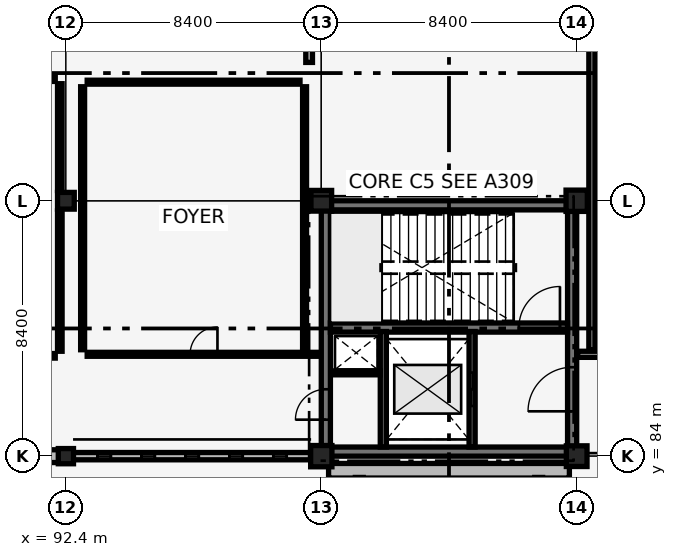
"""IFC4 building model, lengths in metres.
Left out: names, types, materials, properties, quantities, classifications, styles, units other than length and angle.
Written with IfcOpenShell. Run it as: python <this file> out.ifc"""

import sys

from ifc_helpers import new_model, si_unit, direction, frame, frame_2d, origin, origin_2d, place, context, subcontext, project, spatial, rectangle, extrude, element, fill, save


model = new_model("IFC4")
c1 = context("Model", 3, precision=1e-05, world=origin(), true_north=direction((0.0, 1.0)))
c2 = subcontext(c1, "Body", "Model", "MODEL_VIEW")
j1 = project(units=[si_unit("LENGTHUNIT", "METRE"), si_unit("PLANEANGLEUNIT", "RADIAN")], contexts=[c1])
p1 = place(None, origin())
s1 = spatial("IfcSite", under=j1, at=p1, CompositionType="ELEMENT")
p2 = place(p1, origin())
s2 = spatial("IfcBuilding", under=s1, at=p2, CompositionType="ELEMENT")
p3 = place(p2, origin())
s3 = spatial("IfcBuildingStorey", under=s2, at=p3, CompositionType="ELEMENT", Elevation=0.0)
for number, where, z_axis, x_axis in (
    (1, (100.95, 84.15, 0.0), (0.0, 0.0, 1.0), (1.0, 0.0, 0.0)),
    (2, (100.95, 92.25, 0.0), (0.0, 0.0, 1.0), (1.0, 0.0, 0.0)),
):
    element("IfcWall", number, at=place(p3, frame(where, z_axis=z_axis, x_axis=x_axis)), inside=s3, PredefinedType="SHEAR", context=c2, shape_type="SweptSolid", body=[
        extrude(rectangle(XDim=8.1, YDim=0.3, at=frame_2d((4.05, 0.0))), origin(), (0.0, 0.0, 1.0), 5.14),
    ])
p4 = place(p3, frame((100.95, 84.15, 0.0), z_axis=(0.0, 0.0, 1.0), x_axis=(0.0, 1.0, 0.0)))
e3 = element("IfcWall", 3, at=p4, inside=s3, PredefinedType="SHEAR", context=c2, shape_type="SweptSolid", body=[
    extrude(rectangle(XDim=8.1, YDim=0.3, at=frame_2d((4.05, 0.0))), origin(), (0.0, 0.0, 1.0), 5.14),
])
p5 = place(p4, frame((1.05, 0.0, 0.0)))
e4 = element("IfcOpeningElement", 4, at=p5, cuts=e3, PredefinedType="OPENING", context=c2, shape_type="SweptSolid", body=[
    extrude(rectangle(XDim=1.0, YDim=2.15, at=frame_2d((0.5, 1.075))), frame((0.0, 0.16, 0.0), z_axis=(0.0, -1.0, 0.0), x_axis=(1.0, 0.0, 0.0)), (0.0, 0.0, 1.0), 0.32),
])
p6 = place(p3, frame((109.05, 84.15, 0.0), z_axis=(0.0, 0.0, 1.0), x_axis=(0.0, 1.0, 0.0)))
e5 = element("IfcWall", 5, at=p6, inside=s3, PredefinedType="SHEAR", context=c2, shape_type="SweptSolid", body=[
    extrude(rectangle(XDim=8.1, YDim=0.3, at=frame_2d((4.05, 0.0))), origin(), (0.0, 0.0, 1.0), 5.14),
])
p7 = place(p6, frame((1.325, 0.0, 0.0)))
e6 = element("IfcOpeningElement", 6, at=p7, cuts=e5, PredefinedType="OPENING", context=c2, shape_type="SweptSolid", body=[
    extrude(rectangle(XDim=1.45, YDim=2.15, at=frame_2d((0.725, 1.075))), frame((0.0, 0.16, 0.0), z_axis=(0.0, -1.0, 0.0), x_axis=(1.0, 0.0, 0.0)), (0.0, 0.0, 1.0), 0.32),
])
p8 = place(p3, frame((101.1, 88.23, 0.0), z_axis=(0.0, 0.0, 1.0), x_axis=(1.0, 0.0, 0.0)))
e7 = element("IfcWall", 7, at=p8, inside=s3, PredefinedType="SHEAR", context=c2, shape_type="SweptSolid", body=[
    extrude(rectangle(XDim=7.8, YDim=0.3, at=frame_2d((3.9, 0.0))), origin(), (0.0, 0.0, 1.0), 5.14),
])
p9 = place(p8, frame((6.2, 0.0, 0.0)))
e8 = element("IfcOpeningElement", 8, at=p9, cuts=e7, PredefinedType="OPENING", context=c2, shape_type="SweptSolid", body=[
    extrude(rectangle(XDim=1.35, YDim=2.15, at=frame_2d((0.675, 1.075))), frame((0.0, 0.16, 0.0), z_axis=(0.0, -1.0, 0.0), x_axis=(1.0, 0.0, 0.0)), (0.0, 0.0, 1.0), 0.32),
])
p10 = place(p3, frame((92.4, 84.0, -0.32), z_axis=(0.0, 0.0, 1.0), x_axis=(1.0, 0.0, 0.0)))
e9 = element("IfcColumn", 9, at=p10, inside=s3, PredefinedType="COLUMN", context=c2, shape_type="SweptSolid", body=[
    extrude(rectangle(XDim=0.5, YDim=0.5, at=origin_2d()), origin(), (0.0, 0.0, 1.0), 5.46),
])
p11 = place(p3, frame((92.4, 92.4, -0.32), z_axis=(0.0, 0.0, 1.0), x_axis=(1.0, 0.0, 0.0)))
e10 = element("IfcColumn", 10, at=p11, inside=s3, PredefinedType="COLUMN", context=c2, shape_type="SweptSolid", body=[
    extrude(rectangle(XDim=0.55, YDim=0.55, at=origin_2d()), origin(), (0.0, 0.0, 1.0), 5.46),
])
p12 = place(p3, frame((100.8, 84.0, 0.0), z_axis=(0.0, 0.0, 1.0), x_axis=(1.0, 0.0, 0.0)))
e11 = element("IfcColumn", 11, at=p12, inside=s3, PredefinedType="COLUMN", context=c2, shape_type="SweptSolid", body=[
    extrude(rectangle(XDim=0.7, YDim=0.7, at=origin_2d()), origin(), (0.0, 0.0, 1.0), 5.14),
])
for number, where, z_axis, x_axis in (
    (12, (100.8, 92.4, 0.0), (0.0, 0.0, 1.0), (1.0, 0.0, 0.0)),
    (13, (109.2, 84.0, 0.0), (0.0, 0.0, 1.0), (1.0, 0.0, 0.0)),
):
    element("IfcColumn", number, at=place(p3, frame(where, z_axis=z_axis, x_axis=x_axis)), inside=s3, PredefinedType="COLUMN", context=c2, shape_type="SweptSolid", body=[
        extrude(rectangle(XDim=0.68, YDim=0.68, at=origin_2d()), origin(), (0.0, 0.0, 1.0), 5.14),
    ])
p13 = place(p3, frame((109.2, 92.4, 0.0), z_axis=(0.0, 0.0, 1.0), x_axis=(1.0, 0.0, 0.0)))
e14 = element("IfcColumn", 14, at=p13, inside=s3, PredefinedType="COLUMN", context=c2, shape_type="SweptSolid", body=[
    extrude(rectangle(XDim=0.7, YDim=0.7, at=origin_2d()), origin(), (0.0, 0.0, 1.0), 5.14),
])
p14 = place(p3, frame((84.26, 84.0, 0.0), z_axis=(0.0, 0.0, 1.0), x_axis=(1.0, 0.0, 0.0)))
e15 = element("IfcWall", 15, at=p14, inside=s3, PredefinedType="SOLIDWALL", context=c2, shape_type="SweptSolid", body=[
    extrude(rectangle(XDim=7.905, YDim=0.42, at=frame_2d((3.953, 0.0))), origin(), (0.0, 0.0, 1.0), 4.4),
])
p15 = place(p14, frame((2.853, 0.0, 0.0)))
e16 = element("IfcOpeningElement", 16, at=p15, cuts=e15, PredefinedType="OPENING", context=c2, shape_type="SweptSolid", body=[
    extrude(rectangle(XDim=2.2, YDim=2.4, at=frame_2d((1.1, 1.2))), frame((0.0, 0.22, 0.0), z_axis=(0.0, -1.0, 0.0), x_axis=(1.0, 0.0, 0.0)), (0.0, 0.0, 1.0), 0.44),
])
p16 = place(p3, frame((92.635, 84.0, 0.0), z_axis=(0.0, 0.0, 1.0), x_axis=(1.0, 0.0, 0.0)))
e17 = element("IfcWall", 17, at=p16, inside=s3, PredefinedType="SOLIDWALL", context=c2, shape_type="SweptSolid", body=[
    extrude(rectangle(XDim=7.83, YDim=0.24, at=frame_2d((3.915, 0.0))), origin(), (0.0, 0.0, 1.0), 4.4),
])
p17 = place(p16, frame((0.803, 0.0, 0.35)))
e18 = element("IfcOpeningElement", 18, at=p17, cuts=e17, PredefinedType="OPENING", context=c2, shape_type="SweptSolid", body=[
    extrude(rectangle(XDim=0.44, YDim=1.25, at=frame_2d((0.22, 0.625))), frame((0.0, 0.13, 0.0), z_axis=(0.0, -1.0, 0.0), x_axis=(1.0, 0.0, 0.0)), (0.0, 0.0, 1.0), 0.26),
])
p18 = place(p16, frame((2.249, 0.0, 0.35)))
e19 = element("IfcOpeningElement", 19, at=p18, cuts=e17, PredefinedType="OPENING", context=c2, shape_type="SweptSolid", body=[
    extrude(rectangle(XDim=0.44, YDim=1.25, at=frame_2d((0.22, 0.625))), frame((0.0, 0.13, 0.0), z_axis=(0.0, -1.0, 0.0), x_axis=(1.0, 0.0, 0.0)), (0.0, 0.0, 1.0), 0.26),
])
p19 = place(p16, frame((3.695, 0.0, 0.35)))
e20 = element("IfcOpeningElement", 20, at=p19, cuts=e17, PredefinedType="OPENING", context=c2, shape_type="SweptSolid", body=[
    extrude(rectangle(XDim=0.44, YDim=1.25, at=frame_2d((0.22, 0.625))), frame((0.0, 0.13, 0.0), z_axis=(0.0, -1.0, 0.0), x_axis=(1.0, 0.0, 0.0)), (0.0, 0.0, 1.0), 0.26),
])
p20 = place(p16, frame((5.141, 0.0, 0.35)))
e21 = element("IfcOpeningElement", 21, at=p20, cuts=e17, PredefinedType="OPENING", context=c2, shape_type="SweptSolid", body=[
    extrude(rectangle(XDim=0.44, YDim=1.25, at=frame_2d((0.22, 0.625))), frame((0.0, 0.13, 0.0), z_axis=(0.0, -1.0, 0.0), x_axis=(1.0, 0.0, 0.0)), (0.0, 0.0, 1.0), 0.26),
])
p21 = place(p16, frame((6.587, 0.0, 0.35)))
e22 = element("IfcOpeningElement", 22, at=p21, cuts=e17, PredefinedType="OPENING", context=c2, shape_type="SweptSolid", body=[
    extrude(rectangle(XDim=0.44, YDim=1.25, at=frame_2d((0.22, 0.625))), frame((0.0, 0.13, 0.0), z_axis=(0.0, -1.0, 0.0), x_axis=(1.0, 0.0, 0.0)), (0.0, 0.0, 1.0), 0.26),
])
p22 = place(p16, frame((0.803, 0.0, 1.8)))
e23 = element("IfcOpeningElement", 23, at=p22, cuts=e17, PredefinedType="OPENING", context=c2, shape_type="SweptSolid", body=[
    extrude(rectangle(XDim=0.44, YDim=1.25, at=frame_2d((0.22, 0.625))), frame((0.0, 0.13, 0.0), z_axis=(0.0, -1.0, 0.0), x_axis=(1.0, 0.0, 0.0)), (0.0, 0.0, 1.0), 0.26),
])
p23 = place(p16, frame((2.249, 0.0, 1.8)))
e24 = element("IfcOpeningElement", 24, at=p23, cuts=e17, PredefinedType="OPENING", context=c2, shape_type="SweptSolid", body=[
    extrude(rectangle(XDim=0.44, YDim=1.25, at=frame_2d((0.22, 0.625))), frame((0.0, 0.13, 0.0), z_axis=(0.0, -1.0, 0.0), x_axis=(1.0, 0.0, 0.0)), (0.0, 0.0, 1.0), 0.26),
])
p24 = place(p16, frame((3.695, 0.0, 1.8)))
e25 = element("IfcOpeningElement", 25, at=p24, cuts=e17, PredefinedType="OPENING", context=c2, shape_type="SweptSolid", body=[
    extrude(rectangle(XDim=0.44, YDim=1.25, at=frame_2d((0.22, 0.625))), frame((0.0, 0.13, 0.0), z_axis=(0.0, -1.0, 0.0), x_axis=(1.0, 0.0, 0.0)), (0.0, 0.0, 1.0), 0.26),
])
p25 = place(p16, frame((5.141, 0.0, 1.8)))
e26 = element("IfcOpeningElement", 26, at=p25, cuts=e17, PredefinedType="OPENING", context=c2, shape_type="SweptSolid", body=[
    extrude(rectangle(XDim=0.44, YDim=1.25, at=frame_2d((0.22, 0.625))), frame((0.0, 0.13, 0.0), z_axis=(0.0, -1.0, 0.0), x_axis=(1.0, 0.0, 0.0)), (0.0, 0.0, 1.0), 0.26),
])
p26 = place(p16, frame((6.587, 0.0, 1.8)))
e27 = element("IfcOpeningElement", 27, at=p26, cuts=e17, PredefinedType="OPENING", context=c2, shape_type="SweptSolid", body=[
    extrude(rectangle(XDim=0.44, YDim=1.25, at=frame_2d((0.22, 0.625))), frame((0.0, 0.13, 0.0), z_axis=(0.0, -1.0, 0.0), x_axis=(1.0, 0.0, 0.0)), (0.0, 0.0, 1.0), 0.26),
])
p27 = place(p3, frame((101.04, 83.52, -0.25), z_axis=(0.0, 0.0, 1.0), x_axis=(1.0, 0.0, 0.0)))
e28 = element("IfcWall", 28, at=p27, inside=s3, PredefinedType="SOLIDWALL", context=c2, shape_type="SweptSolid", body=[
    extrude(rectangle(XDim=7.92, YDim=0.48, at=frame_2d((3.96, 0.0))), origin(), (0.0, 0.0, 1.0), 5.69),
])
p28 = place(p3, frame((105.76, 84.3, 0.0), z_axis=(0.0, 0.0, 1.0), x_axis=(0.0, 1.0, 0.0)))
e29 = element("IfcWall", 29, at=p28, inside=s3, PredefinedType="SHEAR", context=c2, shape_type="SweptSolid", body=[
    extrude(rectangle(XDim=3.8, YDim=0.2, at=frame_2d((1.9, 0.0))), origin(), (0.0, 0.0, 1.0), 4.4),
])
p29 = place(p28, frame((1.35, 0.0, 0.0)))
e30 = element("IfcOpeningElement", 30, at=p29, cuts=e29, PredefinedType="OPENING", context=c2, shape_type="SweptSolid", body=[
    extrude(rectangle(XDim=1.1, YDim=2.15, at=frame_2d((0.55, 1.075))), frame((0.0, 0.11, 0.0), z_axis=(0.0, -1.0, 0.0), x_axis=(1.0, 0.0, 0.0)), (0.0, 0.0, 1.0), 0.22),
])
p30 = place(p3, frame((102.84, 84.3, 0.0), z_axis=(0.0, 0.0, 1.0), x_axis=(0.0, 1.0, 0.0)))
e31 = element("IfcWall", 31, at=p30, inside=s3, PredefinedType="SHEAR", context=c2, shape_type="SweptSolid", body=[
    extrude(rectangle(XDim=3.8, YDim=0.2, at=frame_2d((1.9, 0.0))), origin(), (0.0, 0.0, 1.0), 4.4),
])
p31 = place(p3, frame((101.12, 86.74, 0.0), z_axis=(0.0, 0.0, 1.0), x_axis=(1.0, 0.0, 0.0)))
e32 = element("IfcWall", 32, at=p31, inside=s3, PredefinedType="PARTITIONING", context=c2, shape_type="SweptSolid", body=[
    extrude(rectangle(XDim=1.62, YDim=0.13, at=frame_2d((0.81, 0.0))), origin(), (0.0, 0.0, 1.0), 5.14),
])
p32 = place(p3, frame((71.38, 87.3, 0.0), z_axis=(0.0, 0.0, 1.0), x_axis=(1.0, 0.0, 0.0)))
e33 = element("IfcWall", 33, at=p32, inside=s3, PredefinedType="PARTITIONING", context=c2, shape_type="SweptSolid", body=[
    extrude(rectangle(XDim=20.67, YDim=0.15, at=frame_2d((10.335, 0.0))), origin(), (0.0, 0.0, 1.0), 4.49),
])
p33 = place(p32, frame((9.81, 0.0, 0.0)))
e34 = element("IfcOpeningElement", 34, at=p33, cuts=e33, PredefinedType="OPENING", context=c2, shape_type="SweptSolid", body=[
    extrude(rectangle(XDim=1.05, YDim=2.15, at=frame_2d((0.525, 1.075))), frame((0.0, 0.085, 0.0), z_axis=(0.0, -1.0, 0.0), x_axis=(1.0, 0.0, 0.0)), (0.0, 0.0, 1.0), 0.17),
])
p34 = place(p3, frame((71.38, 96.4, 0.0), z_axis=(0.0, 0.0, 1.0), x_axis=(1.0, 0.0, 0.0)))
e35 = element("IfcWall", 35, at=p34, inside=s3, PredefinedType="PARTITIONING", context=c2, shape_type="SweptSolid", body=[
    extrude(rectangle(XDim=20.67, YDim=0.15, at=frame_2d((10.335, 0.0))), origin(), (0.0, 0.0, 1.0), 4.74),
])
p35 = place(p3, frame((92.2, 87.45, 0.0), z_axis=(0.0, 0.0, 1.0), x_axis=(0.0, 1.0, 0.0)))
e36 = element("IfcWall", 36, at=p35, inside=s3, PredefinedType="PARTITIONING", context=c2, shape_type="SweptSolid", body=[
    extrude(rectangle(XDim=4.615, YDim=0.15, at=frame_2d((2.308, 0.0))), origin(), (0.0, 0.0, 1.0), 4.59),
])
p36 = place(p3, frame((92.2, 92.735, 0.0), z_axis=(0.0, 0.0, 1.0), x_axis=(0.0, 1.0, 0.0)))
e37 = element("IfcWall", 37, at=p36, inside=s3, PredefinedType="PARTITIONING", context=c2, shape_type="SweptSolid", body=[
    extrude(rectangle(XDim=3.515, YDim=0.15, at=frame_2d((1.757, 0.0))), origin(), (0.0, 0.0, 1.0), 5.14),
])
p37 = place(p3, frame((93.1, 87.35, 0.0), z_axis=(0.0, 0.0, 1.0), x_axis=(1.0, 0.0, 0.0)))
e38 = element("IfcWall", 38, at=p37, inside=s3, PredefinedType="PARTITIONING", context=c2, shape_type="SweptSolid", body=[
    extrude(rectangle(XDim=7.67, YDim=0.13, at=frame_2d((3.835, 0.0))), origin(), (0.0, 0.0, 1.0), 4.49),
])
p38 = place(p37, frame((3.385, 0.0, 0.0)))
e39 = element("IfcOpeningElement", 39, at=p38, cuts=e38, PredefinedType="OPENING", context=c2, shape_type="SweptSolid", body=[
    extrude(rectangle(XDim=0.9, YDim=2.1, at=frame_2d((0.45, 1.05))), frame((0.0, 0.075, 0.0), z_axis=(0.0, -1.0, 0.0), x_axis=(1.0, 0.0, 0.0)), (0.0, 0.0, 1.0), 0.15),
])
p39 = place(p3, frame((93.1, 96.3, 0.0), z_axis=(0.0, 0.0, 1.0), x_axis=(1.0, 0.0, 0.0)))
e40 = element("IfcWall", 40, at=p39, inside=s3, PredefinedType="PARTITIONING", context=c2, shape_type="SweptSolid", body=[
    extrude(rectangle(XDim=7.0, YDim=0.13, at=frame_2d((3.5, 0.0))), origin(), (0.0, 0.0, 1.0), 5.14),
])
for number, where, z_axis, x_axis in (
    (41, (92.95, 87.5, 0.0), (0.0, 0.0, 1.0), (0.0, 1.0, 0.0)),
    (42, (100.25, 87.5, 0.0), (0.0, 0.0, 1.0), (0.0, 1.0, 0.0)),
):
    element("IfcWall", number, at=place(p3, frame(where, z_axis=z_axis, x_axis=x_axis)), inside=s3, PredefinedType="PARTITIONING", context=c2, shape_type="SweptSolid", body=[
        extrude(rectangle(XDim=8.65, YDim=0.13, at=frame_2d((4.325, 0.0))), origin(), (0.0, 0.0, 1.0), 4.46),
    ])
p40 = place(p3, frame((100.4, 96.95, 0.0), z_axis=(0.0, 0.0, 1.0), x_axis=(0.0, 1.0, 0.0)))
e43 = element("IfcWall", 43, at=p40, inside=s3, PredefinedType="PARTITIONING", context=c2, shape_type="SweptSolid", body=[
    extrude(rectangle(XDim=3.44, YDim=0.22, at=frame_2d((1.72, 0.0))), origin(), (0.0, 0.0, 1.0), 5.14),
])
p41 = place(p40, frame((0.87, 0.0, 0.0)))
e44 = element("IfcOpeningElement", 44, at=p41, cuts=e43, PredefinedType="OPENING", context=c2, shape_type="SweptSolid", body=[
    extrude(rectangle(XDim=1.7, YDim=2.25, at=frame_2d((0.85, 1.125))), frame((0.0, 0.12, 0.0), z_axis=(0.0, -1.0, 0.0), x_axis=(1.0, 0.0, 0.0)), (0.0, 0.0, 1.0), 0.24),
])
p42 = place(p3, frame((109.23, 87.35, 0.0), z_axis=(0.0, 0.0, 1.0), x_axis=(1.0, 0.0, 0.0)))
e45 = element("IfcWall", 45, at=p42, inside=s3, PredefinedType="PARTITIONING", context=c2, shape_type="SweptSolid", body=[
    extrude(rectangle(XDim=16.74, YDim=0.2, at=frame_2d((8.37, 0.0))), origin(), (0.0, 0.0, 1.0), 4.49),
])
p43 = place(p42, frame((7.62, 0.0, 0.0)))
e46 = element("IfcOpeningElement", 46, at=p43, cuts=e45, PredefinedType="OPENING", context=c2, shape_type="SweptSolid", body=[
    extrude(rectangle(XDim=1.5, YDim=2.2, at=frame_2d((0.75, 1.1))), frame((0.0, 0.11, 0.0), z_axis=(0.0, -1.0, 0.0), x_axis=(1.0, 0.0, 0.0)), (0.0, 0.0, 1.0), 0.22),
])
p44 = place(p3, frame((109.7, 87.5, 0.0), z_axis=(0.0, 0.0, 1.0), x_axis=(0.0, 1.0, 0.0)))
e47 = element("IfcWall", 47, at=p44, inside=s3, PredefinedType="PARTITIONING", context=c2, shape_type="SweptSolid", body=[
    extrude(rectangle(XDim=29.92, YDim=0.2, at=frame_2d((14.96, 0.0))), origin(), (0.0, 0.0, 1.0), 4.36),
])
p45 = place(p17, origin())
e48 = element("IfcWindow", 48, at=p45, inside=s3, PartitioningType="SINGLE_PANEL", PredefinedType="WINDOW", context=c2, shape_type="SweptSolid", body=[
    extrude(rectangle(XDim=0.44, YDim=1.25, at=frame_2d((0.22, 0.625))), frame((0.0, 0.03, 0.0), z_axis=(0.0, -1.0, 0.0), x_axis=(1.0, 0.0, 0.0)), (0.0, 0.0, 1.0), 0.06),
])
fill(e18, e48)
p46 = place(p18, origin())
e49 = element("IfcWindow", 49, at=p46, inside=s3, PartitioningType="SINGLE_PANEL", PredefinedType="WINDOW", context=c2, shape_type="SweptSolid", body=[
    extrude(rectangle(XDim=0.44, YDim=1.25, at=frame_2d((0.22, 0.625))), frame((0.0, 0.03, 0.0), z_axis=(0.0, -1.0, 0.0), x_axis=(1.0, 0.0, 0.0)), (0.0, 0.0, 1.0), 0.06),
])
fill(e19, e49)
p47 = place(p19, origin())
e50 = element("IfcWindow", 50, at=p47, inside=s3, PartitioningType="SINGLE_PANEL", PredefinedType="WINDOW", context=c2, shape_type="SweptSolid", body=[
    extrude(rectangle(XDim=0.44, YDim=1.25, at=frame_2d((0.22, 0.625))), frame((0.0, 0.03, 0.0), z_axis=(0.0, -1.0, 0.0), x_axis=(1.0, 0.0, 0.0)), (0.0, 0.0, 1.0), 0.06),
])
fill(e20, e50)
p48 = place(p20, origin())
e51 = element("IfcWindow", 51, at=p48, inside=s3, PartitioningType="SINGLE_PANEL", PredefinedType="WINDOW", context=c2, shape_type="SweptSolid", body=[
    extrude(rectangle(XDim=0.44, YDim=1.25, at=frame_2d((0.22, 0.625))), frame((0.0, 0.03, 0.0), z_axis=(0.0, -1.0, 0.0), x_axis=(1.0, 0.0, 0.0)), (0.0, 0.0, 1.0), 0.06),
])
fill(e21, e51)
p49 = place(p21, origin())
e52 = element("IfcWindow", 52, at=p49, inside=s3, PartitioningType="SINGLE_PANEL", PredefinedType="WINDOW", context=c2, shape_type="SweptSolid", body=[
    extrude(rectangle(XDim=0.44, YDim=1.25, at=frame_2d((0.22, 0.625))), frame((0.0, 0.03, 0.0), z_axis=(0.0, -1.0, 0.0), x_axis=(1.0, 0.0, 0.0)), (0.0, 0.0, 1.0), 0.06),
])
fill(e22, e52)
p50 = place(p22, origin())
e53 = element("IfcWindow", 53, at=p50, inside=s3, PartitioningType="SINGLE_PANEL", PredefinedType="WINDOW", context=c2, shape_type="SweptSolid", body=[
    extrude(rectangle(XDim=0.44, YDim=1.25, at=frame_2d((0.22, 0.625))), frame((0.0, 0.03, 0.0), z_axis=(0.0, -1.0, 0.0), x_axis=(1.0, 0.0, 0.0)), (0.0, 0.0, 1.0), 0.06),
])
fill(e23, e53)
p51 = place(p23, origin())
e54 = element("IfcWindow", 54, at=p51, inside=s3, PartitioningType="SINGLE_PANEL", PredefinedType="WINDOW", context=c2, shape_type="SweptSolid", body=[
    extrude(rectangle(XDim=0.44, YDim=1.25, at=frame_2d((0.22, 0.625))), frame((0.0, 0.03, 0.0), z_axis=(0.0, -1.0, 0.0), x_axis=(1.0, 0.0, 0.0)), (0.0, 0.0, 1.0), 0.06),
])
fill(e24, e54)
p52 = place(p24, origin())
e55 = element("IfcWindow", 55, at=p52, inside=s3, PartitioningType="SINGLE_PANEL", PredefinedType="WINDOW", context=c2, shape_type="SweptSolid", body=[
    extrude(rectangle(XDim=0.44, YDim=1.25, at=frame_2d((0.22, 0.625))), frame((0.0, 0.03, 0.0), z_axis=(0.0, -1.0, 0.0), x_axis=(1.0, 0.0, 0.0)), (0.0, 0.0, 1.0), 0.06),
])
fill(e25, e55)
p53 = place(p25, origin())
e56 = element("IfcWindow", 56, at=p53, inside=s3, PartitioningType="SINGLE_PANEL", PredefinedType="WINDOW", context=c2, shape_type="SweptSolid", body=[
    extrude(rectangle(XDim=0.44, YDim=1.25, at=frame_2d((0.22, 0.625))), frame((0.0, 0.03, 0.0), z_axis=(0.0, -1.0, 0.0), x_axis=(1.0, 0.0, 0.0)), (0.0, 0.0, 1.0), 0.06),
])
fill(e26, e56)
p54 = place(p26, origin())
e57 = element("IfcWindow", 57, at=p54, inside=s3, PartitioningType="SINGLE_PANEL", PredefinedType="WINDOW", context=c2, shape_type="SweptSolid", body=[
    extrude(rectangle(XDim=0.44, YDim=1.25, at=frame_2d((0.22, 0.625))), frame((0.0, 0.03, 0.0), z_axis=(0.0, -1.0, 0.0), x_axis=(1.0, 0.0, 0.0)), (0.0, 0.0, 1.0), 0.06),
])
fill(e27, e57)
p55 = place(p9, origin())
e58 = element("IfcDoor", 58, at=p55, inside=s3, OperationType="SINGLE_SWING_RIGHT", PredefinedType="DOOR", context=c2, shape_type="SweptSolid", body=[
    extrude(rectangle(XDim=1.35, YDim=2.15, at=frame_2d((0.675, 1.075))), frame((0.0, 0.025, 0.0), z_axis=(0.0, -1.0, 0.0), x_axis=(1.0, 0.0, 0.0)), (0.0, 0.0, 1.0), 0.05),
])
fill(e8, e58)
p56 = place(p29, origin())
e59 = element("IfcDoor", 59, at=p56, inside=s3, OperationType="SLIDING_TO_LEFT", PredefinedType="DOOR", context=c2, shape_type="SweptSolid", body=[
    extrude(rectangle(XDim=1.1, YDim=2.15, at=frame_2d((0.55, 1.075))), frame((0.0, 0.025, 0.0), z_axis=(0.0, -1.0, 0.0), x_axis=(1.0, 0.0, 0.0)), (0.0, 0.0, 1.0), 0.05),
])
fill(e30, e59)
p57 = place(p7, origin())
e60 = element("IfcDoor", 60, at=p57, inside=s3, OperationType="DOUBLE_DOOR_SINGLE_SWING", PredefinedType="DOOR", context=c2, shape_type="SweptSolid", body=[
    extrude(rectangle(XDim=1.45, YDim=2.15, at=frame_2d((0.725, 1.075))), frame((0.0, 0.025, 0.0), z_axis=(0.0, -1.0, 0.0), x_axis=(1.0, 0.0, 0.0)), (0.0, 0.0, 1.0), 0.05),
])
fill(e6, e60)
p58 = place(p5, origin())
e61 = element("IfcDoor", 61, at=p58, inside=s3, OperationType="SINGLE_SWING_LEFT", PredefinedType="DOOR", context=c2, shape_type="SweptSolid", body=[
    extrude(rectangle(XDim=1.0, YDim=2.15, at=frame_2d((0.5, 1.075))), frame((0.0, 0.025, 0.0), z_axis=(0.0, -1.0, 0.0), x_axis=(1.0, 0.0, 0.0)), (0.0, 0.0, 1.0), 0.05),
])
fill(e4, e61)
p59 = place(p38, origin())
e62 = element("IfcDoor", 62, at=p59, inside=s3, OperationType="SINGLE_SWING_RIGHT", PredefinedType="DOOR", context=c2, shape_type="SweptSolid", body=[
    extrude(rectangle(XDim=0.9, YDim=2.1, at=frame_2d((0.45, 1.05))), frame((0.0, 0.025, 0.0), z_axis=(0.0, -1.0, 0.0), x_axis=(1.0, 0.0, 0.0)), (0.0, 0.0, 1.0), 0.05),
])
fill(e39, e62)
save(model, sys.argv[1])
